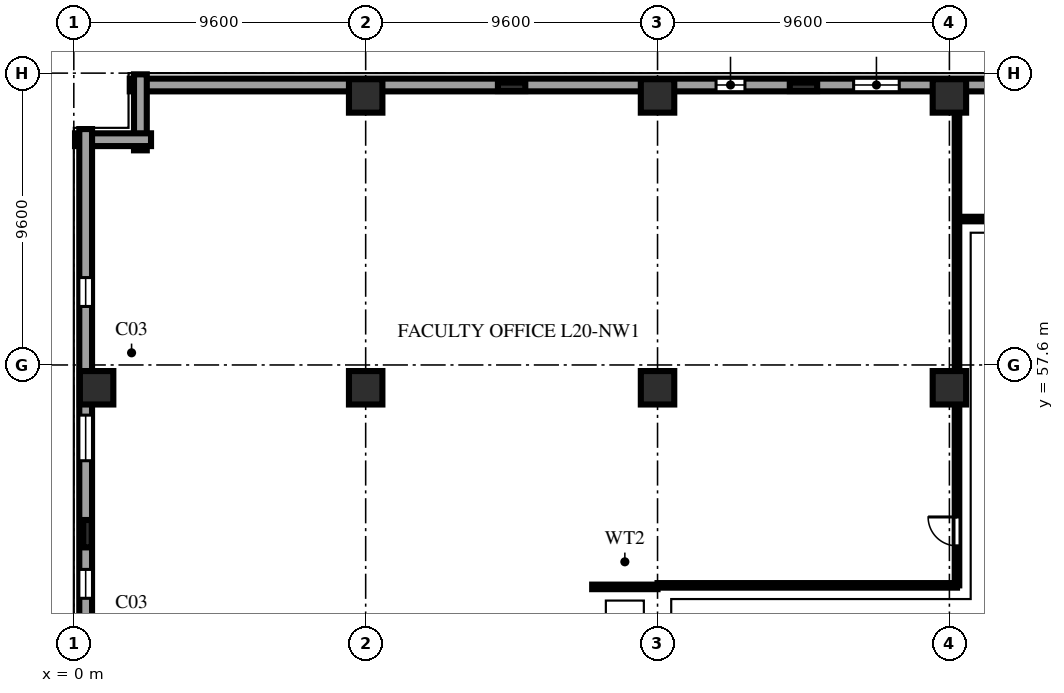
"""IFC4 building model, lengths in metres.
Left out: names, types, materials, properties, quantities, classifications, styles, units other than length and angle.
Written with IfcOpenShell. Run it as: python <this file> out.ifc"""

import sys

from ifc_helpers import new_model, si_unit, direction, frame, frame_2d, origin, origin_2d, place, context, subcontext, project, spatial, rectangle, extrude, element, fill, save


model = new_model("IFC4")
c1 = context("Model", 3, precision=1e-05, world=origin(), true_north=direction((0.0, 1.0)))
c2 = subcontext(c1, "Body", "Model", "MODEL_VIEW")
j1 = project(units=[si_unit("LENGTHUNIT", "METRE"), si_unit("PLANEANGLEUNIT", "RADIAN")], contexts=[c1])
p1 = place(None, origin())
s1 = spatial("IfcSite", under=j1, at=p1, CompositionType="ELEMENT")
p2 = place(p1, origin())
s2 = spatial("IfcBuilding", under=s1, at=p2, CompositionType="ELEMENT")
p3 = place(p2, frame((0.0, 0.0, 81.2)))
s3 = spatial("IfcBuildingStorey", under=s2, at=p3, CompositionType="ELEMENT", Elevation=81.2)
for number, where, z_axis, x_axis in (
    (1, (0.75, 56.85, 0.0), (0.0, 0.0, 1.0), (1.0, 0.0, 0.0)),
    (2, (9.6, 56.85, 0.0), (0.0, 0.0, 1.0), (1.0, 0.0, 0.0)),
    (3, (9.6, 66.45, 0.0), (0.0, 0.0, 1.0), (1.0, 0.0, 0.0)),
    (4, (19.2, 56.85, 0.0), (0.0, 0.0, 1.0), (1.0, 0.0, 0.0)),
    (5, (19.2, 66.45, 0.0), (0.0, 0.0, 1.0), (1.0, 0.0, 0.0)),
    (6, (28.8, 56.85, 0.0), (0.0, 0.0, 1.0), (1.0, 0.0, 0.0)),
    (7, (28.8, 66.45, 0.0), (0.0, 0.0, 1.0), (1.0, 0.0, 0.0)),
):
    element("IfcColumn", number, at=place(p3, frame(where, z_axis=z_axis, x_axis=x_axis)), inside=s3, PredefinedType="COLUMN", context=c2, shape_type="SweptSolid", body=[
        extrude(rectangle(XDim=1.1, YDim=1.1, at=origin_2d()), origin(), (0.0, 0.0, 1.0), 3.8),
    ])
for number, where, z_axis, x_axis in (
    (8, (0.45, 52.05, 0.0), (0.0, 0.0, 1.0), (0.0, 1.0, 0.0)),
    (9, (14.4, 66.75, 0.0), (0.0, 0.0, 1.0), (1.0, 0.0, 0.0)),
    (10, (24.0, 66.75, 0.0), (0.0, 0.0, 1.0), (1.0, 0.0, 0.0)),
):
    element("IfcColumn", number, at=place(p3, frame(where, z_axis=z_axis, x_axis=x_axis)), inside=s3, PredefinedType="PILASTER", context=c2, shape_type="SweptSolid", body=[
        extrude(rectangle(XDim=0.9, YDim=0.28, at=origin_2d()), origin(), (0.0, 0.0, 1.0), 3.8),
    ])
p4 = place(p3, frame((36.56, 66.81, 0.0), z_axis=(0.0, 0.0, 1.0), x_axis=(-1.0, 0.0, 0.0)))
e11 = element("IfcWall", 11, at=p4, inside=s3, PredefinedType="SOLIDWALL", context=c2, shape_type="SweptSolid", body=[
    extrude(rectangle(XDim=34.72, YDim=0.42, at=frame_2d((17.36, 0.0))), origin(), (0.0, 0.0, 1.0), 3.54),
])
p5 = place(p4, frame((9.41, 0.0, 0.9)))
e12 = element("IfcOpeningElement", 12, at=p5, cuts=e11, PredefinedType="OPENING", context=c2, shape_type="SweptSolid", body=[
    extrude(rectangle(XDim=1.5, YDim=1.85, at=frame_2d((0.75, 0.925))), frame((0.0, 0.222, 0.0), z_axis=(0.0, -1.0, 0.0), x_axis=(1.0, 0.0, 0.0)), (0.0, 0.0, 1.0), 0.444),
])
p6 = place(p4, frame((14.485, 0.0, 0.9)))
e13 = element("IfcOpeningElement", 13, at=p6, cuts=e11, PredefinedType="OPENING", context=c2, shape_type="SweptSolid", body=[
    extrude(rectangle(XDim=0.95, YDim=1.85, at=frame_2d((0.475, 0.925))), frame((0.0, 0.222, 0.0), z_axis=(0.0, -1.0, 0.0), x_axis=(1.0, 0.0, 0.0)), (0.0, 0.0, 1.0), 0.444),
])
for number, where, z_axis, x_axis in (
    (14, (2.19, 67.16, 0.0), (0.0, 0.0, 1.0), (0.0, -1.0, 0.0)),
    (15, (2.54, 65.01, 0.0), (0.0, 0.0, 1.0), (-1.0, 0.0, 0.0)),
):
    element("IfcWall", number, at=place(p3, frame(where, z_axis=z_axis, x_axis=x_axis)), inside=s3, PredefinedType="SOLIDWALL", context=c2, shape_type="SweptSolid", body=[
        extrude(rectangle(XDim=2.5, YDim=0.42, at=frame_2d((1.25, 0.0))), origin(), (0.0, 0.0, 1.0), 3.54),
    ])
p7 = place(p3, frame((0.39, 65.36, 0.0), z_axis=(0.0, 0.0, 1.0), x_axis=(0.0, -1.0, 0.0)))
e16 = element("IfcWall", 16, at=p7, inside=s3, PredefinedType="SOLIDWALL", context=c2, shape_type="SweptSolid", body=[
    extrude(rectangle(XDim=63.52, YDim=0.42, at=frame_2d((31.76, 0.0))), origin(), (0.0, 0.0, 1.0), 3.54),
])
p8 = place(p7, frame((4.885, 0.0, 0.9)))
e17 = element("IfcOpeningElement", 17, at=p8, cuts=e16, PredefinedType="OPENING", context=c2, shape_type="SweptSolid", body=[
    extrude(rectangle(XDim=0.95, YDim=1.85, at=frame_2d((0.475, 0.925))), frame((0.0, 0.222, 0.0), z_axis=(0.0, -1.0, 0.0), x_axis=(1.0, 0.0, 0.0)), (0.0, 0.0, 1.0), 0.444),
])
p9 = place(p7, frame((9.41, 0.0, 0.9)))
e18 = element("IfcOpeningElement", 18, at=p9, cuts=e16, PredefinedType="OPENING", context=c2, shape_type="SweptSolid", body=[
    extrude(rectangle(XDim=1.5, YDim=1.85, at=frame_2d((0.75, 0.925))), frame((0.0, 0.222, 0.0), z_axis=(0.0, -1.0, 0.0), x_axis=(1.0, 0.0, 0.0)), (0.0, 0.0, 1.0), 0.444),
])
p10 = place(p7, frame((14.485, 0.0, 0.9)))
e19 = element("IfcOpeningElement", 19, at=p10, cuts=e16, PredefinedType="OPENING", context=c2, shape_type="SweptSolid", body=[
    extrude(rectangle(XDim=0.95, YDim=1.85, at=frame_2d((0.475, 0.925))), frame((0.0, 0.222, 0.0), z_axis=(0.0, -1.0, 0.0), x_axis=(1.0, 0.0, 0.0)), (0.0, 0.0, 1.0), 0.444),
])
p11 = place(p7, frame((19.01, 0.0, 0.9)))
e20 = element("IfcOpeningElement", 20, at=p11, cuts=e16, PredefinedType="OPENING", context=c2, shape_type="SweptSolid", body=[
    extrude(rectangle(XDim=1.5, YDim=1.85, at=frame_2d((0.75, 0.925))), frame((0.0, 0.222, 0.0), z_axis=(0.0, -1.0, 0.0), x_axis=(1.0, 0.0, 0.0)), (0.0, 0.0, 1.0), 0.444),
])
p12 = place(p7, frame((24.085, 0.0, 0.9)))
e21 = element("IfcOpeningElement", 21, at=p12, cuts=e16, PredefinedType="OPENING", context=c2, shape_type="SweptSolid", body=[
    extrude(rectangle(XDim=0.95, YDim=1.85, at=frame_2d((0.475, 0.925))), frame((0.0, 0.222, 0.0), z_axis=(0.0, -1.0, 0.0), x_axis=(1.0, 0.0, 0.0)), (0.0, 0.0, 1.0), 0.444),
])
p13 = place(p7, frame((28.61, 0.0, 0.9)))
e22 = element("IfcOpeningElement", 22, at=p13, cuts=e16, PredefinedType="OPENING", context=c2, shape_type="SweptSolid", body=[
    extrude(rectangle(XDim=1.5, YDim=1.85, at=frame_2d((0.75, 0.925))), frame((0.0, 0.222, 0.0), z_axis=(0.0, -1.0, 0.0), x_axis=(1.0, 0.0, 0.0)), (0.0, 0.0, 1.0), 0.444),
])
p14 = place(p7, frame((33.685, 0.0, 0.9)))
e23 = element("IfcOpeningElement", 23, at=p14, cuts=e16, PredefinedType="OPENING", context=c2, shape_type="SweptSolid", body=[
    extrude(rectangle(XDim=0.95, YDim=1.85, at=frame_2d((0.475, 0.925))), frame((0.0, 0.222, 0.0), z_axis=(0.0, -1.0, 0.0), x_axis=(1.0, 0.0, 0.0)), (0.0, 0.0, 1.0), 0.444),
])
p15 = place(p7, frame((38.21, 0.0, 0.9)))
e24 = element("IfcOpeningElement", 24, at=p15, cuts=e16, PredefinedType="OPENING", context=c2, shape_type="SweptSolid", body=[
    extrude(rectangle(XDim=1.5, YDim=1.85, at=frame_2d((0.75, 0.925))), frame((0.0, 0.222, 0.0), z_axis=(0.0, -1.0, 0.0), x_axis=(1.0, 0.0, 0.0)), (0.0, 0.0, 1.0), 0.444),
])
p16 = place(p7, frame((43.285, 0.0, 0.9)))
e25 = element("IfcOpeningElement", 25, at=p16, cuts=e16, PredefinedType="OPENING", context=c2, shape_type="SweptSolid", body=[
    extrude(rectangle(XDim=0.95, YDim=1.85, at=frame_2d((0.475, 0.925))), frame((0.0, 0.222, 0.0), z_axis=(0.0, -1.0, 0.0), x_axis=(1.0, 0.0, 0.0)), (0.0, 0.0, 1.0), 0.444),
])
p17 = place(p7, frame((47.81, 0.0, 0.9)))
e26 = element("IfcOpeningElement", 26, at=p17, cuts=e16, PredefinedType="OPENING", context=c2, shape_type="SweptSolid", body=[
    extrude(rectangle(XDim=1.5, YDim=1.85, at=frame_2d((0.75, 0.925))), frame((0.0, 0.222, 0.0), z_axis=(0.0, -1.0, 0.0), x_axis=(1.0, 0.0, 0.0)), (0.0, 0.0, 1.0), 0.444),
])
p18 = place(p7, frame((52.885, 0.0, 0.9)))
e27 = element("IfcOpeningElement", 27, at=p18, cuts=e16, PredefinedType="OPENING", context=c2, shape_type="SweptSolid", body=[
    extrude(rectangle(XDim=0.95, YDim=1.85, at=frame_2d((0.475, 0.925))), frame((0.0, 0.222, 0.0), z_axis=(0.0, -1.0, 0.0), x_axis=(1.0, 0.0, 0.0)), (0.0, 0.0, 1.0), 0.444),
])
p19 = place(p3, frame((17.05, 50.3, 0.0), z_axis=(0.0, 0.0, 1.0), x_axis=(1.0, 0.0, 0.0)))
e28 = element("IfcWall", 28, at=p19, inside=s3, PredefinedType="PARTITIONING", context=c2, shape_type="SweptSolid", body=[
    extrude(rectangle(XDim=2.15, YDim=0.15, at=frame_2d((1.075, 0.0))), origin(), (0.0, 0.0, 1.0), 3.54),
])
p20 = place(p3, frame((19.2, 50.35, 0.0), z_axis=(0.0, 0.0, 1.0), x_axis=(1.0, 0.0, 0.0)))
e29 = element("IfcWall", 29, at=p20, inside=s3, PredefinedType="PARTITIONING", context=c2, shape_type="SweptSolid", body=[
    extrude(rectangle(XDim=9.85, YDim=0.15, at=frame_2d((4.925, 0.0))), origin(), (0.0, 0.0, 1.0), 3.54),
])
p21 = place(p3, frame((29.05, 62.4, 0.0), z_axis=(0.0, 0.0, 1.0), x_axis=(1.0, 0.0, 0.0)))
e30 = element("IfcWall", 30, at=p21, inside=s3, PredefinedType="PARTITIONING", context=c2, shape_type="SweptSolid", body=[
    extrude(rectangle(XDim=2.15, YDim=0.15, at=frame_2d((1.075, 0.0))), origin(), (0.0, 0.0, 1.0), 3.54),
])
p22 = place(p3, frame((29.05, 50.35, 0.0), z_axis=(0.0, 0.0, 1.0), x_axis=(0.0, 1.0, 0.0)))
e31 = element("IfcWall", 31, at=p22, inside=s3, PredefinedType="PARTITIONING", context=c2, shape_type="SweptSolid", body=[
    extrude(rectangle(XDim=16.63, YDim=0.15, at=frame_2d((8.315, 0.0))), origin(), (0.0, 0.0, 1.0), 3.54),
])
p23 = place(p22, frame((1.3, 0.0, 0.0)))
e32 = element("IfcOpeningElement", 32, at=p23, cuts=e31, PredefinedType="OPENING", context=c2, shape_type="SweptSolid", body=[
    extrude(rectangle(XDim=0.95, YDim=2.15, at=frame_2d((0.475, 1.075))), frame((0.0, 0.087, 0.0), z_axis=(0.0, -1.0, 0.0), x_axis=(1.0, 0.0, 0.0)), (0.0, 0.0, 1.0), 0.174),
])
p24 = place(p5, origin())
e33 = element("IfcWindow", 33, at=p24, inside=s3, PartitioningType="DOUBLE_PANEL_VERTICAL", PredefinedType="WINDOW", context=c2, shape_type="SweptSolid", body=[
    extrude(rectangle(XDim=1.5, YDim=1.85, at=frame_2d((0.75, 0.925))), frame((0.0, 0.11, 0.0), z_axis=(0.0, -1.0, 0.0), x_axis=(1.0, 0.0, 0.0)), (0.0, 0.0, 1.0), 0.06),
])
fill(e12, e33)
p25 = place(p6, origin())
e34 = element("IfcWindow", 34, at=p25, inside=s3, PartitioningType="SINGLE_PANEL", PredefinedType="WINDOW", context=c2, shape_type="SweptSolid", body=[
    extrude(rectangle(XDim=0.95, YDim=1.85, at=frame_2d((0.475, 0.925))), frame((0.0, 0.11, 0.0), z_axis=(0.0, -1.0, 0.0), x_axis=(1.0, 0.0, 0.0)), (0.0, 0.0, 1.0), 0.06),
])
fill(e13, e34)
p26 = place(p8, origin())
e35 = element("IfcWindow", 35, at=p26, inside=s3, PartitioningType="SINGLE_PANEL", PredefinedType="WINDOW", context=c2, shape_type="SweptSolid", body=[
    extrude(rectangle(XDim=0.95, YDim=1.85, at=frame_2d((0.475, 0.925))), frame((0.0, 0.11, 0.0), z_axis=(0.0, -1.0, 0.0), x_axis=(1.0, 0.0, 0.0)), (0.0, 0.0, 1.0), 0.06),
])
fill(e17, e35)
p27 = place(p9, origin())
e36 = element("IfcWindow", 36, at=p27, inside=s3, PartitioningType="DOUBLE_PANEL_VERTICAL", PredefinedType="WINDOW", context=c2, shape_type="SweptSolid", body=[
    extrude(rectangle(XDim=1.5, YDim=1.85, at=frame_2d((0.75, 0.925))), frame((0.0, 0.11, 0.0), z_axis=(0.0, -1.0, 0.0), x_axis=(1.0, 0.0, 0.0)), (0.0, 0.0, 1.0), 0.06),
])
fill(e18, e36)
p28 = place(p10, origin())
e37 = element("IfcWindow", 37, at=p28, inside=s3, PartitioningType="SINGLE_PANEL", PredefinedType="WINDOW", context=c2, shape_type="SweptSolid", body=[
    extrude(rectangle(XDim=0.95, YDim=1.85, at=frame_2d((0.475, 0.925))), frame((0.0, 0.11, 0.0), z_axis=(0.0, -1.0, 0.0), x_axis=(1.0, 0.0, 0.0)), (0.0, 0.0, 1.0), 0.06),
])
fill(e19, e37)
p29 = place(p23, origin())
e38 = element("IfcDoor", 38, at=p29, inside=s3, OperationType="SINGLE_SWING_RIGHT", PredefinedType="DOOR", context=c2, shape_type="SweptSolid", body=[
    extrude(rectangle(XDim=0.95, YDim=2.15, at=frame_2d((0.475, 1.075))), frame((0.0, 0.025, 0.0), z_axis=(0.0, -1.0, 0.0), x_axis=(1.0, 0.0, 0.0)), (0.0, 0.0, 1.0), 0.05),
])
fill(e32, e38)
save(model, sys.argv[1])
